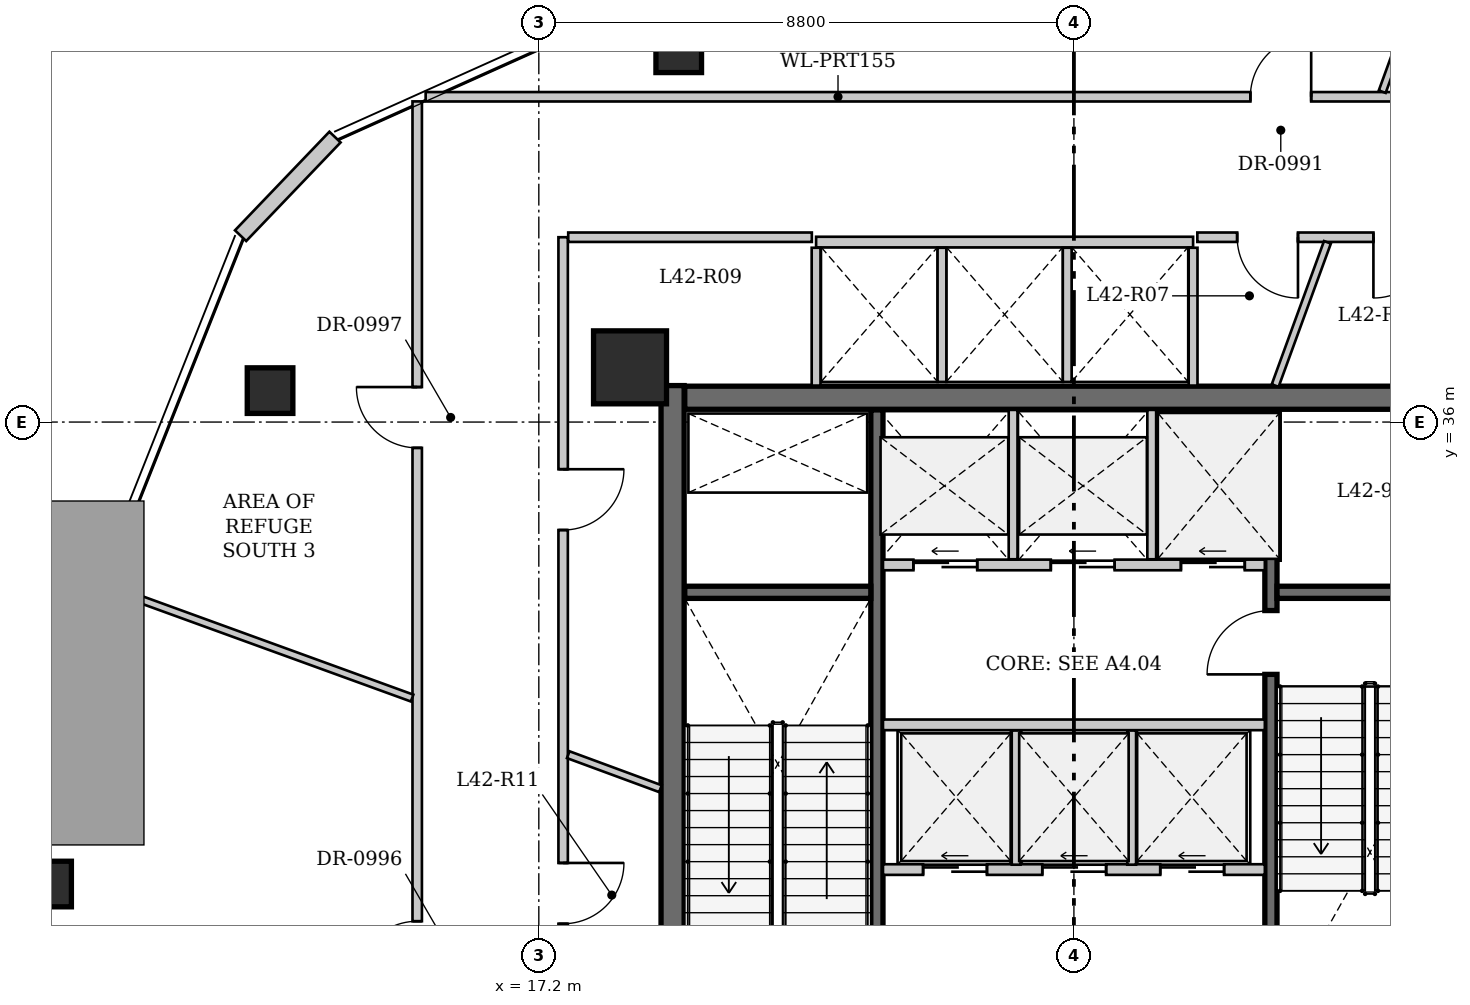
"""IFC4 building model, lengths in metres.
Left out: names, types, materials, properties, quantities, classifications, styles, units other than length and angle.
Written with IfcOpenShell. Run it as: python <this file> out.ifc"""

import sys

from ifc_helpers import new_model, si_unit, direction, frame, frame_2d, origin, origin_2d, place, context, subcontext, project, spatial, rectangle, hollow_rectangle, extrude, source, transform, mapped, element, fill, save


model = new_model("IFC4")
c1 = context("Model", 3, precision=1e-05, world=origin(), true_north=direction((0.0, 1.0)))
c2 = subcontext(c1, "Body", "Model", "MODEL_VIEW")
j1 = project(units=[si_unit("LENGTHUNIT", "METRE"), si_unit("PLANEANGLEUNIT", "RADIAN")], contexts=[c1])
p1 = place(None, origin())
s1 = spatial("IfcSite", under=j1, at=p1, CompositionType="ELEMENT")
p2 = place(p1, origin())
s2 = spatial("IfcBuilding", under=s1, at=p2, CompositionType="ELEMENT")
p3 = place(p2, frame((0.0, 0.0, 162.4)))
s3 = spatial("IfcBuildingStorey", under=s2, at=p3, CompositionType="ELEMENT", Elevation=162.4)
for number, where, z_axis, x_axis in (
    (1, (9.138, 28.402, 0.0), (0.0, 0.0, 1.0), (1.0, 0.0, 0.0)),
    (2, (12.78, 36.517, 0.0), (0.0, 0.0, 1.0), (1.0, 0.0, 0.0)),
    (3, (19.501, 42.123, 0.0), (0.0, 0.0, 1.0), (1.0, 0.0, 0.0)),
):
    element("IfcColumn", number, at=place(p3, frame(where, z_axis=z_axis, x_axis=x_axis)), inside=s3, PredefinedType="COLUMN", context=c2, shape_type="SweptSolid", body=[
        extrude(hollow_rectangle(XDim=0.75, YDim=0.75, WallThickness=0.04, at=origin_2d()), origin(), (0.0, 0.0, 1.0), 4.15),
    ])
p4 = place(p3, frame((18.7, 36.9, 0.0), z_axis=(0.0, 0.0, 1.0), x_axis=(1.0, 0.0, 0.0)))
e4 = element("IfcColumn", 4, at=p4, inside=s3, PredefinedType="COLUMN", context=c2, shape_type="SweptSolid", body=[
    extrude(rectangle(XDim=1.2, YDim=1.2, at=origin_2d()), origin(), (0.0, 0.0, 1.0), 4.15),
])
p5 = place(p3, frame((12.295, 39.065, 0.0), z_axis=(0.0, 0.0, 1.0), x_axis=(0.69149665435, 0.722379662659, 0.0)))
e5 = element("IfcWall", 5, at=p5, inside=s3, PredefinedType="SOLIDWALL", context=c2, shape_type="SweptSolid", body=[
    extrude(rectangle(XDim=2.245, YDim=0.255, at=frame_2d((1.123, 0.0))), origin(), (0.0, 0.0, 1.0), 4.15),
])
p6 = place(p3, frame((19.4, 25.8, 0.0), z_axis=(0.0, 0.0, 1.0), x_axis=(0.0, 1.0, 0.0)))
e6 = element("IfcWall", 6, at=p6, inside=s3, PredefinedType="SHEAR", context=c2, shape_type="SweptSolid", body=[
    extrude(rectangle(XDim=10.8, YDim=0.38, at=frame_2d((5.4, 0.0))), origin(), (0.0, 0.0, 1.0), 4.6),
])
p7 = place(p3, frame((19.6, 36.4, 0.0), z_axis=(0.0, 0.0, 1.0), x_axis=(1.0, 0.0, 0.0)))
e7 = element("IfcWall", 7, at=p7, inside=s3, PredefinedType="SHEAR", context=c2, shape_type="SweptSolid", body=[
    extrude(rectangle(XDim=12.8, YDim=0.38, at=frame_2d((6.4, 0.0))), origin(), (0.0, 0.0, 1.0), 4.6),
])
p8 = place(p3, frame((22.76, 26.2, 0.0), z_axis=(0.0, 0.0, 1.0), x_axis=(0.0, 1.0, 0.0)))
e8 = element("IfcWall", 8, at=p8, inside=s3, PredefinedType="SHEAR", context=c2, shape_type="SweptSolid", body=[
    extrude(rectangle(XDim=10.0, YDim=0.2, at=frame_2d((5.0, 0.0))), origin(), (0.0, 0.0, 1.0), 4.6),
])
p9 = place(p3, frame((29.24, 26.2, 0.0), z_axis=(0.0, 0.0, 1.0), x_axis=(0.0, 1.0, 0.0)))
e9 = element("IfcWall", 9, at=p9, inside=s3, PredefinedType="SHEAR", context=c2, shape_type="SweptSolid", body=[
    extrude(rectangle(XDim=10.0, YDim=0.2, at=frame_2d((5.0, 0.0))), origin(), (0.0, 0.0, 1.0), 4.6),
])
p10 = place(p9, frame((5.65, 0.0, 0.0)))
e10 = element("IfcOpeningElement", 10, at=p10, cuts=e9, PredefinedType="OPENING", context=c2, shape_type="SweptSolid", body=[
    extrude(rectangle(XDim=1.05, YDim=2.15, at=frame_2d((0.525, 1.075))), frame((0.0, 0.11, 0.0), z_axis=(0.0, -1.0, 0.0), x_axis=(1.0, 0.0, 0.0)), (0.0, 0.0, 1.0), 0.22),
])
for number, where, z_axis, x_axis in (
    (11, (19.6, 33.2, 0.0), (0.0, 0.0, 1.0), (1.0, 0.0, 0.0)),
    (12, (29.34, 33.2, 0.0), (0.0, 0.0, 1.0), (1.0, 0.0, 0.0)),
):
    element("IfcWall", number, at=place(p3, frame(where, z_axis=z_axis, x_axis=x_axis)), inside=s3, PredefinedType="SHEAR", context=c2, shape_type="SweptSolid", body=[
        extrude(rectangle(XDim=3.06, YDim=0.2, at=frame_2d((1.53, 0.0))), origin(), (0.0, 0.0, 1.0), 4.6),
    ])
p11 = place(p3, frame((22.86, 33.65, 0.0), z_axis=(0.0, 0.0, 1.0), x_axis=(1.0, 0.0, 0.0)))
e13 = element("IfcWall", 13, at=p11, inside=s3, PredefinedType="SOLIDWALL", context=c2, shape_type="SweptSolid", body=[
    extrude(rectangle(XDim=6.28, YDim=0.175, at=frame_2d((3.14, 0.0))), origin(), (0.0, 0.0, 1.0), 4.15),
])
p12 = place(p11, frame((0.5, 0.0, 0.0)))
e14 = element("IfcOpeningElement", 14, at=p12, cuts=e13, PredefinedType="OPENING", context=c2, shape_type="SweptSolid", body=[
    extrude(rectangle(XDim=1.05, YDim=2.15, at=frame_2d((0.525, 1.075))), frame((0.0, 0.098, 0.0), z_axis=(0.0, -1.0, 0.0), x_axis=(1.0, 0.0, 0.0)), (0.0, 0.0, 1.0), 0.195),
])
p13 = place(p11, frame((2.76, 0.0, 0.0)))
e15 = element("IfcOpeningElement", 15, at=p13, cuts=e13, PredefinedType="OPENING", context=c2, shape_type="SweptSolid", body=[
    extrude(rectangle(XDim=1.05, YDim=2.15, at=frame_2d((0.525, 1.075))), frame((0.0, 0.098, 0.0), z_axis=(0.0, -1.0, 0.0), x_axis=(1.0, 0.0, 0.0)), (0.0, 0.0, 1.0), 0.195),
])
p14 = place(p11, frame((4.9, 0.0, 0.0)))
e16 = element("IfcOpeningElement", 16, at=p14, cuts=e13, PredefinedType="OPENING", context=c2, shape_type="SweptSolid", body=[
    extrude(rectangle(XDim=1.05, YDim=2.15, at=frame_2d((0.525, 1.075))), frame((0.0, 0.098, 0.0), z_axis=(0.0, -1.0, 0.0), x_axis=(1.0, 0.0, 0.0)), (0.0, 0.0, 1.0), 0.195),
])
for number, where, z_axis, x_axis in (
    (17, (25.0, 33.743, 0.0), (0.0, 0.0, 1.0), (0.0, 1.0, 0.0)),
    (18, (27.28, 33.743, 0.0), (0.0, 0.0, 1.0), (0.0, 1.0, 0.0)),
):
    element("IfcWall", number, at=place(p3, frame(where, z_axis=z_axis, x_axis=x_axis)), inside=s3, PredefinedType="SOLIDWALL", context=c2, shape_type="SweptSolid", body=[
        extrude(rectangle(XDim=2.457, YDim=0.145, at=frame_2d((1.228, 0.0))), origin(), (0.0, 0.0, 1.0), 4.15),
    ])
p15 = place(p3, frame((22.86, 31.02, 0.0), z_axis=(0.0, 0.0, 1.0), x_axis=(1.0, 0.0, 0.0)))
e19 = element("IfcWall", 19, at=p15, inside=s3, PredefinedType="SOLIDWALL", context=c2, shape_type="SweptSolid", body=[
    extrude(rectangle(XDim=6.28, YDim=0.175, at=frame_2d((3.14, 0.0))), origin(), (0.0, 0.0, 1.0), 4.15),
])
p16 = place(p3, frame((22.86, 28.64, 0.0), z_axis=(0.0, 0.0, 1.0), x_axis=(1.0, 0.0, 0.0)))
e20 = element("IfcWall", 20, at=p16, inside=s3, PredefinedType="SOLIDWALL", context=c2, shape_type="SweptSolid", body=[
    extrude(rectangle(XDim=6.28, YDim=0.175, at=frame_2d((3.14, 0.0))), origin(), (0.0, 0.0, 1.0), 4.15),
])
p17 = place(p16, frame((0.66, 0.0, 0.0)))
e21 = element("IfcOpeningElement", 21, at=p17, cuts=e20, PredefinedType="OPENING", context=c2, shape_type="SweptSolid", body=[
    extrude(rectangle(XDim=1.05, YDim=2.15, at=frame_2d((0.525, 1.075))), frame((0.0, 0.098, 0.0), z_axis=(0.0, -1.0, 0.0), x_axis=(1.0, 0.0, 0.0)), (0.0, 0.0, 1.0), 0.195),
])
p18 = place(p16, frame((2.62, 0.0, 0.0)))
e22 = element("IfcOpeningElement", 22, at=p18, cuts=e20, PredefinedType="OPENING", context=c2, shape_type="SweptSolid", body=[
    extrude(rectangle(XDim=1.05, YDim=2.15, at=frame_2d((0.525, 1.075))), frame((0.0, 0.098, 0.0), z_axis=(0.0, -1.0, 0.0), x_axis=(1.0, 0.0, 0.0)), (0.0, 0.0, 1.0), 0.195),
])
p19 = place(p16, frame((4.56, 0.0, 0.0)))
e23 = element("IfcOpeningElement", 23, at=p19, cuts=e20, PredefinedType="OPENING", context=c2, shape_type="SweptSolid", body=[
    extrude(rectangle(XDim=1.05, YDim=2.15, at=frame_2d((0.525, 1.075))), frame((0.0, 0.098, 0.0), z_axis=(0.0, -1.0, 0.0), x_axis=(1.0, 0.0, 0.0)), (0.0, 0.0, 1.0), 0.195),
])
for number, where, z_axis, x_axis in (
    (24, (25.05, 28.72, 0.0), (0.0, 0.0, 1.0), (0.0, 1.0, 0.0)),
    (25, (26.95, 28.72, 0.0), (0.0, 0.0, 1.0), (0.0, 1.0, 0.0)),
):
    element("IfcWall", number, at=place(p3, frame(where, z_axis=z_axis, x_axis=x_axis)), inside=s3, PredefinedType="SOLIDWALL", context=c2, shape_type="SweptSolid", body=[
        extrude(rectangle(XDim=2.207, YDim=0.145, at=frame_2d((1.103, 0.0))), origin(), (0.0, 0.0, 1.0), 4.15),
    ])
p20 = place(p3, frame((21.76, 38.96, 0.0), z_axis=(0.0, 0.0, 1.0), x_axis=(1.0, 0.0, 0.0)))
e26 = element("IfcWall", 26, at=p20, inside=s3, PredefinedType="SOLIDWALL", context=c2, shape_type="SweptSolid", body=[
    extrude(rectangle(XDim=6.2, YDim=0.175, at=frame_2d((3.1, 0.0))), origin(), (0.0, 0.0, 1.0), 4.15),
])
for number, where, z_axis, x_axis in (
    (27, (21.76, 36.6, 0.0), (0.0, 0.0, 1.0), (0.0, 1.0, 0.0)),
    (28, (27.96, 36.6, 0.0), (0.0, 0.0, 1.0), (0.0, 1.0, 0.0)),
):
    element("IfcWall", number, at=place(p3, frame(where, z_axis=z_axis, x_axis=x_axis)), inside=s3, PredefinedType="SOLIDWALL", context=c2, shape_type="SweptSolid", body=[
        extrude(rectangle(XDim=2.266, YDim=0.145, at=frame_2d((1.133, 0.0))), origin(), (0.0, 0.0, 1.0), 4.15),
    ])
for number, where, z_axis, x_axis in (
    (29, (23.83, 36.66, 0.0), (0.0, 0.0, 1.0), (0.0, 1.0, 0.0)),
    (30, (25.89, 36.66, 0.0), (0.0, 0.0, 1.0), (0.0, 1.0, 0.0)),
):
    element("IfcWall", number, at=place(p3, frame(where, z_axis=z_axis, x_axis=x_axis)), inside=s3, PredefinedType="SOLIDWALL", context=c2, shape_type="SweptSolid", body=[
        extrude(rectangle(XDim=2.207, YDim=0.145, at=frame_2d((1.103, 0.0))), origin(), (0.0, 0.0, 1.0), 4.15),
    ])
p21 = place(p3, frame((15.339, 41.35, 0.0), z_axis=(0.0, 0.0, 1.0), x_axis=(1.0, 0.0, 0.0)))
e31 = element("IfcWall", 31, at=p21, inside=s3, PredefinedType="PARTITIONING", context=c2, shape_type="SweptSolid", body=[
    extrude(rectangle(XDim=20.461, YDim=0.155, at=frame_2d((10.23, 0.0))), origin(), (0.0, 0.0, 1.0), 4.15),
])
p22 = place(p21, frame((13.563, 0.0, 0.0)))
e32 = element("IfcOpeningElement", 32, at=p22, cuts=e31, PredefinedType="OPENING", context=c2, shape_type="SweptSolid", body=[
    extrude(rectangle(XDim=1.0, YDim=2.15, at=frame_2d((0.5, 1.075))), frame((0.0, 0.087, 0.0), z_axis=(0.0, -1.0, 0.0), x_axis=(1.0, 0.0, 0.0)), (0.0, 0.0, 1.0), 0.175),
])
p23 = place(p3, frame((15.2, 23.083, 0.0), z_axis=(0.0, 0.0, 1.0), x_axis=(0.0, 1.0, 0.0)))
e33 = element("IfcWall", 33, at=p23, inside=s3, PredefinedType="PARTITIONING", context=c2, shape_type="SweptSolid", body=[
    extrude(rectangle(XDim=18.19, YDim=0.155, at=frame_2d((9.095, 0.0))), origin(), (0.0, 0.0, 1.0), 4.15),
])
p24 = place(p23, frame((3.706, 0.0, 0.0)))
e34 = element("IfcOpeningElement", 34, at=p24, cuts=e33, PredefinedType="OPENING", context=c2, shape_type="SweptSolid", body=[
    extrude(rectangle(XDim=1.0, YDim=2.15, at=frame_2d((0.5, 1.075))), frame((0.0, 0.087, 0.0), z_axis=(0.0, -1.0, 0.0), x_axis=(1.0, 0.0, 0.0)), (0.0, 0.0, 1.0), 0.175),
])
p25 = place(p23, frame((12.492, 0.0, 0.0)))
e35 = element("IfcOpeningElement", 35, at=p25, cuts=e33, PredefinedType="OPENING", context=c2, shape_type="SweptSolid", body=[
    extrude(rectangle(XDim=1.0, YDim=2.15, at=frame_2d((0.5, 1.075))), frame((0.0, 0.087, 0.0), z_axis=(0.0, -1.0, 0.0), x_axis=(1.0, 0.0, 0.0)), (0.0, 0.0, 1.0), 0.175),
])
p26 = place(p3, frame((32.8, 39.04, 0.0), z_axis=(0.0, 0.0, 1.0), x_axis=(-1.0, 0.0, 0.0)))
e36 = element("IfcWall", 36, at=p26, inside=s3, PredefinedType="PARTITIONING", context=c2, shape_type="SweptSolid", body=[
    extrude(rectangle(XDim=4.77, YDim=0.155, at=frame_2d((2.385, 0.0))), origin(), (0.0, 0.0, 1.0), 4.15),
])
p27 = place(p26, frame((0.875, 0.0, 0.0)))
e37 = element("IfcOpeningElement", 37, at=p27, cuts=e36, PredefinedType="OPENING", context=c2, shape_type="SweptSolid", body=[
    extrude(rectangle(XDim=1.0, YDim=2.15, at=frame_2d((0.5, 1.075))), frame((0.0, 0.087, 0.0), z_axis=(0.0, -1.0, 0.0), x_axis=(1.0, 0.0, 0.0)), (0.0, 0.0, 1.0), 0.175),
])
p28 = place(p26, frame((3.115, 0.0, 0.0)))
e38 = element("IfcOpeningElement", 38, at=p28, cuts=e36, PredefinedType="OPENING", context=c2, shape_type="SweptSolid", body=[
    extrude(rectangle(XDim=1.0, YDim=2.15, at=frame_2d((0.5, 1.075))), frame((0.0, 0.087, 0.0), z_axis=(0.0, -1.0, 0.0), x_axis=(1.0, 0.0, 0.0)), (0.0, 0.0, 1.0), 0.175),
])
p29 = place(p3, frame((17.6, 39.04, 0.0), z_axis=(0.0, 0.0, 1.0), x_axis=(0.0, -1.0, 0.0)))
e39 = element("IfcWall", 39, at=p29, inside=s3, PredefinedType="PARTITIONING", context=c2, shape_type="SweptSolid", body=[
    extrude(rectangle(XDim=13.24, YDim=0.155, at=frame_2d((6.62, 0.0))), origin(), (0.0, 0.0, 1.0), 4.15),
])
p30 = place(p29, frame((3.816, 0.0, 0.0)))
e40 = element("IfcOpeningElement", 40, at=p30, cuts=e39, PredefinedType="OPENING", context=c2, shape_type="SweptSolid", body=[
    extrude(rectangle(XDim=1.0, YDim=2.15, at=frame_2d((0.5, 1.075))), frame((0.0, 0.087, 0.0), z_axis=(0.0, -1.0, 0.0), x_axis=(1.0, 0.0, 0.0)), (0.0, 0.0, 1.0), 0.175),
])
p31 = place(p29, frame((10.292, 0.0, 0.0)))
e41 = element("IfcOpeningElement", 41, at=p31, cuts=e39, PredefinedType="OPENING", context=c2, shape_type="SweptSolid", body=[
    extrude(rectangle(XDim=1.0, YDim=2.15, at=frame_2d((0.5, 1.075))), frame((0.0, 0.087, 0.0), z_axis=(0.0, -1.0, 0.0), x_axis=(1.0, 0.0, 0.0)), (0.0, 0.0, 1.0), 0.175),
])
p32 = place(p3, frame((21.69, 39.04, 0.0), z_axis=(0.0, 0.0, 1.0), x_axis=(-1.0, 0.0, 0.0)))
e42 = element("IfcWall", 42, at=p32, inside=s3, PredefinedType="PARTITIONING", context=c2, shape_type="SweptSolid", body=[
    extrude(rectangle(XDim=4.006, YDim=0.155, at=frame_2d((2.003, 0.0))), origin(), (0.0, 0.0, 1.0), 4.15),
])
p33 = place(p3, frame((10.029, 33.309, 0.0), z_axis=(0.0, 0.0, 1.0), x_axis=(0.939892148961, -0.341471445836, 0.0)))
e43 = element("IfcWall", 43, at=p33, inside=s3, PredefinedType="PARTITIONING", context=c2, shape_type="SweptSolid", body=[
    extrude(rectangle(XDim=5.413, YDim=0.12, at=frame_2d((2.707, 0.0))), origin(), (0.0, 0.0, 1.0), 4.15),
])
p34 = place(p3, frame((31.07, 41.434, 0.0), z_axis=(0.0, 0.0, 1.0), x_axis=(0.342105504572, 0.939661547442, 0.0)))
e44 = element("IfcWall", 44, at=p34, inside=s3, PredefinedType="PARTITIONING", context=c2, shape_type="SweptSolid", body=[
    extrude(rectangle(XDim=4.705, YDim=0.12, at=frame_2d((2.353, 0.0))), origin(), (0.0, 0.0, 1.0), 4.15),
])
p35 = place(p3, frame((29.31, 36.6, 0.0), z_axis=(0.0, 0.0, 1.0), x_axis=(0.342618216876, 0.939474724229, 0.0)))
e45 = element("IfcWall", 45, at=p35, inside=s3, PredefinedType="PARTITIONING", context=c2, shape_type="SweptSolid", body=[
    extrude(rectangle(XDim=2.508, YDim=0.12, at=frame_2d((1.254, 0.0))), origin(), (0.0, 0.0, 1.0), 4.15),
])
p36 = place(p3, frame((19.2, 29.97, 0.0), z_axis=(0.0, 0.0, 1.0), x_axis=(-0.938208937942, 0.34606934098, 0.0)))
e46 = element("IfcWall", 46, at=p36, inside=s3, PredefinedType="PARTITIONING", context=c2, shape_type="SweptSolid", body=[
    extrude(rectangle(XDim=1.616, YDim=0.12, at=frame_2d((0.808, 0.0))), origin(), (0.0, 0.0, 1.0), 4.15),
])
m1 = source(origin(), c2, "Body", "SweptSolid", [
    extrude(rectangle(XDim=1.05, YDim=2.15, at=frame_2d((0.525, 1.075))), frame((0.0, 0.025, 0.0), z_axis=(0.0, -1.0, 0.0), x_axis=(1.0, 0.0, 0.0)), (0.0, 0.0, 1.0), 0.05),
])
p37 = place(p10, origin())
e47 = element("IfcDoor", 47, at=p37, inside=s3, OperationType="SINGLE_SWING_LEFT", PredefinedType="DOOR", context=c2, shape_type="MappedRepresentation", body=[
    mapped(m1, transform((0.0, 0.0, 0.0), x_axis=(1.0, 0.0, 0.0), y_axis=(0.0, 1.0, 0.0), z_axis=(0.0, 0.0, 1.0), scale=1.0)),
])
fill(e10, e47)
m2 = source(origin(), c2, "Body", "SweptSolid", [
    extrude(rectangle(XDim=1.05, YDim=2.15, at=frame_2d((0.525, 1.075))), frame((0.0, 0.025, 0.0), z_axis=(0.0, -1.0, 0.0), x_axis=(1.0, 0.0, 0.0)), (0.0, 0.0, 1.0), 0.05),
])
p38 = place(p12, origin())
e48 = element("IfcDoor", 48, at=p38, inside=s3, OperationType="SLIDING_TO_LEFT", PredefinedType="DOOR", context=c2, shape_type="MappedRepresentation", body=[
    mapped(m2, transform((0.0, 0.0, 0.0), x_axis=(1.0, 0.0, 0.0), y_axis=(0.0, 1.0, 0.0), z_axis=(0.0, 0.0, 1.0), scale=1.0)),
])
fill(e14, e48)
p39 = place(p13, origin())
e49 = element("IfcDoor", 49, at=p39, inside=s3, OperationType="SLIDING_TO_LEFT", PredefinedType="DOOR", context=c2, shape_type="MappedRepresentation", body=[
    mapped(m2, transform((0.0, 0.0, 0.0), x_axis=(1.0, 0.0, 0.0), y_axis=(0.0, 1.0, 0.0), z_axis=(0.0, 0.0, 1.0), scale=1.0)),
])
fill(e15, e49)
p40 = place(p14, origin())
e50 = element("IfcDoor", 50, at=p40, inside=s3, OperationType="SLIDING_TO_LEFT", PredefinedType="DOOR", context=c2, shape_type="MappedRepresentation", body=[
    mapped(m2, transform((0.0, 0.0, 0.0), x_axis=(1.0, 0.0, 0.0), y_axis=(0.0, 1.0, 0.0), z_axis=(0.0, 0.0, 1.0), scale=1.0)),
])
fill(e16, e50)
p41 = place(p17, origin())
e51 = element("IfcDoor", 51, at=p41, inside=s3, OperationType="SLIDING_TO_LEFT", PredefinedType="DOOR", context=c2, shape_type="MappedRepresentation", body=[
    mapped(m2, transform((0.0, 0.0, 0.0), x_axis=(1.0, 0.0, 0.0), y_axis=(0.0, 1.0, 0.0), z_axis=(0.0, 0.0, 1.0), scale=1.0)),
])
fill(e21, e51)
p42 = place(p18, origin())
e52 = element("IfcDoor", 52, at=p42, inside=s3, OperationType="SLIDING_TO_LEFT", PredefinedType="DOOR", context=c2, shape_type="MappedRepresentation", body=[
    mapped(m2, transform((0.0, 0.0, 0.0), x_axis=(1.0, 0.0, 0.0), y_axis=(0.0, 1.0, 0.0), z_axis=(0.0, 0.0, 1.0), scale=1.0)),
])
fill(e22, e52)
p43 = place(p19, origin())
e53 = element("IfcDoor", 53, at=p43, inside=s3, OperationType="SLIDING_TO_LEFT", PredefinedType="DOOR", context=c2, shape_type="MappedRepresentation", body=[
    mapped(m2, transform((0.0, 0.0, 0.0), x_axis=(1.0, 0.0, 0.0), y_axis=(0.0, 1.0, 0.0), z_axis=(0.0, 0.0, 1.0), scale=1.0)),
])
fill(e23, e53)
m3 = source(origin(), c2, "Body", "SweptSolid", [
    extrude(rectangle(XDim=1.0, YDim=2.15, at=frame_2d((0.5, 1.075))), frame((0.0, 0.025, 0.0), z_axis=(0.0, -1.0, 0.0), x_axis=(1.0, 0.0, 0.0)), (0.0, 0.0, 1.0), 0.05),
])
p44 = place(p22, origin())
e54 = element("IfcDoor", 54, at=p44, inside=s3, OperationType="SINGLE_SWING_RIGHT", PredefinedType="DOOR", context=c2, shape_type="MappedRepresentation", body=[
    mapped(m3, transform((0.0, 0.0, 0.0), x_axis=(1.0, 0.0, 0.0), y_axis=(0.0, 1.0, 0.0), z_axis=(0.0, 0.0, 1.0), scale=1.0)),
])
fill(e32, e54)
p45 = place(p24, origin())
e55 = element("IfcDoor", 55, at=p45, inside=s3, OperationType="SINGLE_SWING_LEFT", PredefinedType="DOOR", context=c2, shape_type="MappedRepresentation", body=[
    mapped(m3, transform((0.0, 0.0, 0.0), x_axis=(1.0, 0.0, 0.0), y_axis=(0.0, 1.0, 0.0), z_axis=(0.0, 0.0, 1.0), scale=1.0)),
])
fill(e34, e55)
p46 = place(p25, origin())
e56 = element("IfcDoor", 56, at=p46, inside=s3, OperationType="SINGLE_SWING_RIGHT", PredefinedType="DOOR", context=c2, shape_type="MappedRepresentation", body=[
    mapped(m3, transform((0.0, 0.0, 0.0), x_axis=(1.0, 0.0, 0.0), y_axis=(0.0, 1.0, 0.0), z_axis=(0.0, 0.0, 1.0), scale=1.0)),
])
fill(e35, e56)
p47 = place(p27, origin())
e57 = element("IfcDoor", 57, at=p47, inside=s3, OperationType="SINGLE_SWING_RIGHT", PredefinedType="DOOR", context=c2, shape_type="MappedRepresentation", body=[
    mapped(m3, transform((0.0, 0.0, 0.0), x_axis=(1.0, 0.0, 0.0), y_axis=(0.0, 1.0, 0.0), z_axis=(0.0, 0.0, 1.0), scale=1.0)),
])
fill(e37, e57)
p48 = place(p28, origin())
e58 = element("IfcDoor", 58, at=p48, inside=s3, OperationType="SINGLE_SWING_LEFT", PredefinedType="DOOR", context=c2, shape_type="MappedRepresentation", body=[
    mapped(m3, transform((0.0, 0.0, 0.0), x_axis=(1.0, 0.0, 0.0), y_axis=(0.0, 1.0, 0.0), z_axis=(0.0, 0.0, 1.0), scale=1.0)),
])
fill(e38, e58)
p49 = place(p30, origin())
e59 = element("IfcDoor", 59, at=p49, inside=s3, OperationType="SINGLE_SWING_LEFT", PredefinedType="DOOR", context=c2, shape_type="MappedRepresentation", body=[
    mapped(m3, transform((0.0, 0.0, 0.0), x_axis=(1.0, 0.0, 0.0), y_axis=(0.0, 1.0, 0.0), z_axis=(0.0, 0.0, 1.0), scale=1.0)),
])
fill(e40, e59)
p50 = place(p31, origin())
e60 = element("IfcDoor", 60, at=p50, inside=s3, OperationType="SINGLE_SWING_LEFT", PredefinedType="DOOR", context=c2, shape_type="MappedRepresentation", body=[
    mapped(m3, transform((0.0, 0.0, 0.0), x_axis=(1.0, 0.0, 0.0), y_axis=(0.0, 1.0, 0.0), z_axis=(0.0, 0.0, 1.0), scale=1.0)),
])
fill(e41, e60)
save(model, sys.argv[1])
